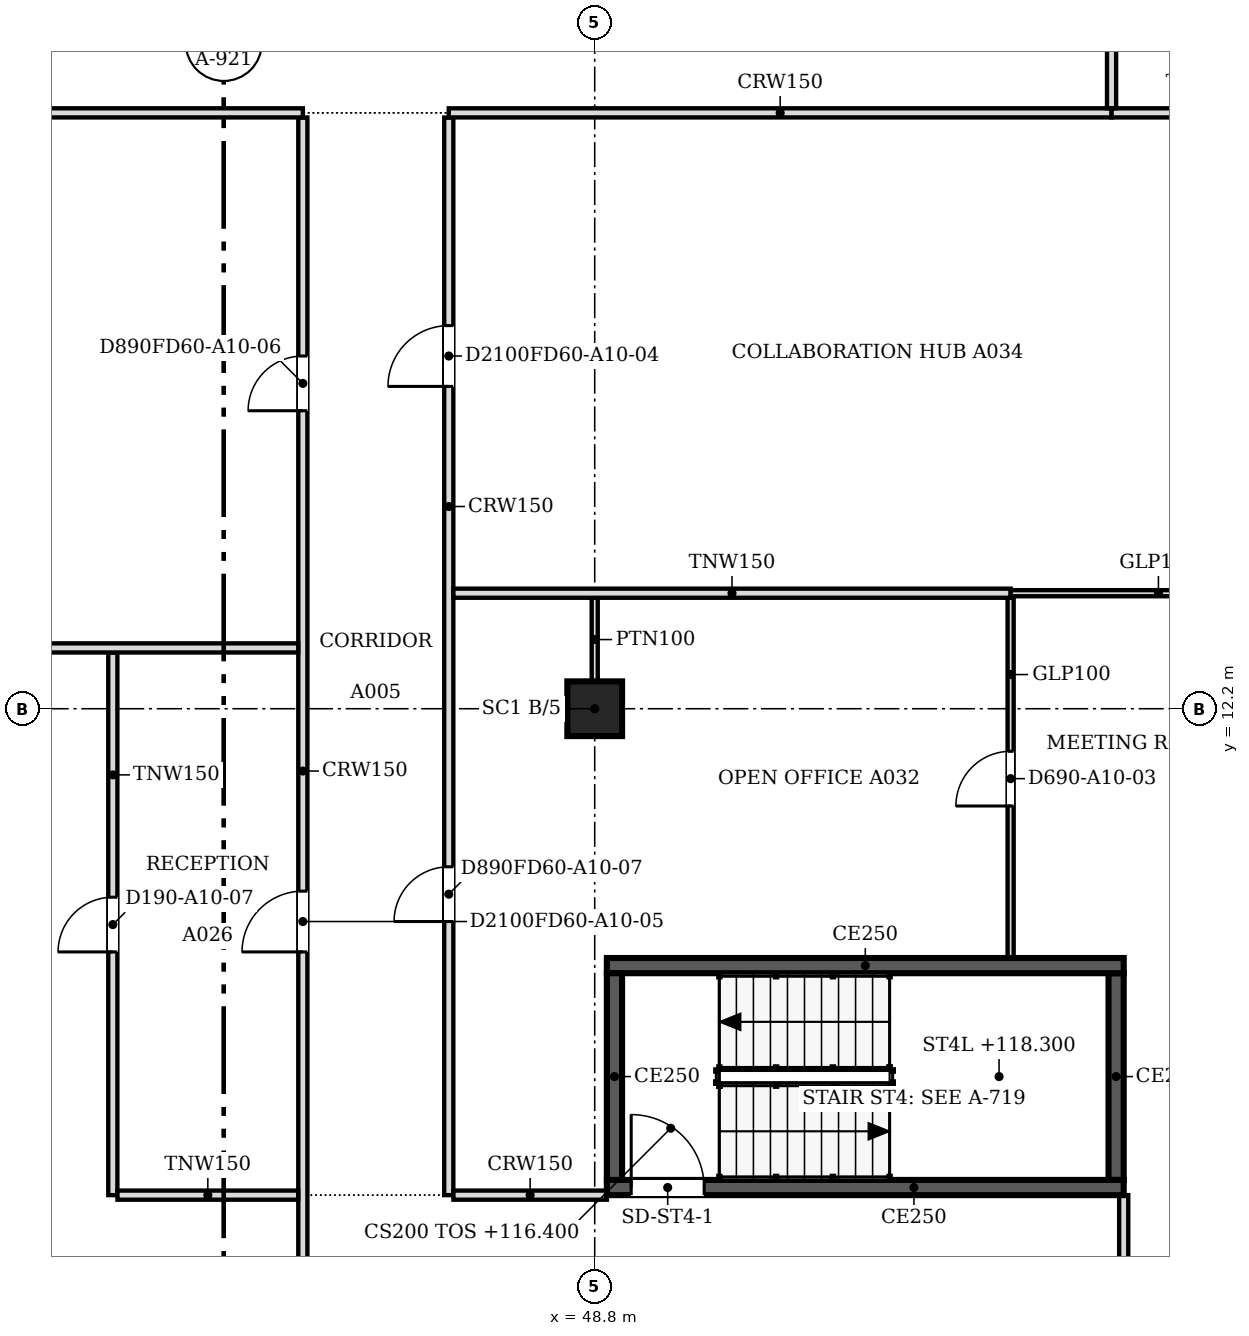
"""IFC4 building model, lengths in metres.
Left out: names, types, materials, properties, quantities, classifications, styles, units other than length and angle.
Written with IfcOpenShell. Run it as: python <this file> out.ifc"""

import sys

from ifc_helpers import new_model, si_unit, direction, frame, frame_2d, origin, origin_2d, place, context, subcontext, project, spatial, polyline, rectangle, outline, extrude, faceted_brep, source, transform, mapped, element, fill, save


model = new_model("IFC4")
c1 = context("Model", 3, precision=1e-05, world=origin(), true_north=direction((0.0, 1.0)))
c2 = subcontext(c1, "Body", "Model", "MODEL_VIEW")
j1 = project(units=[si_unit("LENGTHUNIT", "METRE"), si_unit("PLANEANGLEUNIT", "RADIAN")], contexts=[c1])
p1 = place(None, origin())
s1 = spatial("IfcSite", under=j1, at=p1, CompositionType="ELEMENT")
p2 = place(p1, origin())
s2 = spatial("IfcBuilding", under=s1, at=p2, CompositionType="ELEMENT")
p3 = place(p2, frame((0.0, 0.0, 116.4)))
s3 = spatial("IfcBuildingStorey", under=s2, at=p3, CompositionType="ELEMENT", Elevation=116.4)
p4 = place(p3, frame((48.8, 12.2, 0.0), z_axis=(0.0, 0.0, 1.0), x_axis=(1.0, 0.0, 0.0)))
e1 = element("IfcColumn", 1, at=p4, inside=s3, PredefinedType="COLUMN", context=c2, shape_type="SweptSolid", body=[
    extrude(rectangle(XDim=0.9, YDim=0.9, at=origin_2d()), origin(), (0.0, 0.0, 1.0), 3.6),
])
m1 = source(origin(), c2, "Body", "Brep", [
    faceted_brep([(0.053, -0.25, 0.0), (2.997, -0.25, 3.8), (0.053, -0.25, 7.6), (0.0, -0.25, 7.532), (0.0, -0.25, 0.068), (0.106, 0.25, 7.531), (2.944, 0.25, 3.868), (2.944, 0.25, 3.732), (0.106, 0.25, 0.068), (2.997, 0.0, 3.8), (0.053, 0.0, 0.0), (0.053, 0.0, 7.6)], [[[0, 1, 2, 3, 4]], [[5, 6, 7, 8]], [[8, 7, 9, 1, 0, 10]], [[6, 5, 11, 2, 1, 9]], [[3, 2, 11]], [[10, 0, 4]], [[8, 10, 4, 3, 11, 5]], [[9, 7, 6]]]),
])
p5 = place(p3, frame((57.569, 1.274, -3.8), z_axis=(0.0, 0.0, 1.0), x_axis=(0.707066050402, 0.707147509625, 0.0)))
e2 = element("IfcWall", 2, at=p5, inside=s3, PredefinedType="SOLIDWALL", context=c2, shape_type="MappedRepresentation", body=[
    mapped(m1, transform((0.0, 0.0, 0.0), scale=1.0)),
])
m2 = source(origin(), c2, "Body", "SweptSolid", [
    extrude(outline(polyline([(0.253, 0.666), (2.681, 3.8), (0.253, 6.934), (0.253, 0.666)])), frame((0.0, 0.26, 0.0), z_axis=(0.0, -1.0, 0.0), x_axis=(1.0, 0.0, 0.0)), (0.0, 0.0, 1.0), 0.52),
])
p6 = place(p5, origin())
e3 = element("IfcOpeningElement", 3, at=p6, cuts=e2, PredefinedType="OPENING", context=c2, shape_type="MappedRepresentation", body=[
    mapped(m2, transform((0.0, 0.0, 0.0), scale=1.0)),
])
p7 = place(p2, frame((0.0, 0.0, 120.2)))
s4 = spatial("IfcBuildingStorey", under=s2, at=p7, CompositionType="ELEMENT", Elevation=120.2)
m3 = source(origin(), c2, "Body", "Brep", [
    faceted_brep([(2.944, -0.25, 0.0), (2.997, -0.25, 0.068), (2.997, -0.25, 7.532), (2.944, -0.25, 7.6), (0.0, -0.25, 3.8), (0.053, 0.25, 3.868), (2.891, 0.25, 7.532), (2.891, 0.25, 0.068), (0.053, 0.25, 3.732), (2.944, 0.0, 0.0), (2.944, 0.0, 7.6), (0.0, 0.0, 3.8)], [[[0, 1, 2, 3, 4]], [[5, 6, 7, 8]], [[1, 0, 9]], [[10, 3, 2]], [[6, 5, 11, 4, 3, 10]], [[8, 7, 9, 0, 4, 11]], [[8, 11, 5]], [[1, 9, 7, 6, 10, 2]]]),
])
p8 = place(p7, frame((57.606, 1.312, -3.8), z_axis=(0.0, 0.0, 1.0), x_axis=(0.707147509625, 0.707066050402, 0.0)))
e4 = element("IfcWall", 4, at=p8, inside=s4, PredefinedType="SOLIDWALL", context=c2, shape_type="MappedRepresentation", body=[
    mapped(m3, transform((0.0, 0.0, 0.0), scale=1.0)),
])
m4 = source(origin(), c2, "Body", "SweptSolid", [
    extrude(outline(polyline([(2.744, 6.934), (0.316, 3.8), (2.744, 0.667), (2.744, 6.934)])), frame((0.0, 0.26, 0.0), z_axis=(0.0, -1.0, 0.0), x_axis=(1.0, 0.0, 0.0)), (0.0, 0.0, 1.0), 0.52),
])
p9 = place(p8, origin())
e5 = element("IfcOpeningElement", 5, at=p9, cuts=e4, PredefinedType="OPENING", context=c2, shape_type="MappedRepresentation", body=[
    mapped(m4, transform((0.0, 0.0, 0.0), scale=1.0)),
])
p10 = place(p3, frame((57.5, 4.325, 0.0), z_axis=(0.0, 0.0, 1.0), x_axis=(-1.0, 0.0, 0.0)))
e6 = element("IfcWall", 6, at=p10, inside=s3, PredefinedType="SOLIDWALL", context=c2, shape_type="SweptSolid", body=[
    extrude(rectangle(XDim=8.5, YDim=0.25, at=frame_2d((4.25, 0.0))), origin(), (0.0, 0.0, 1.0), 3.8),
])
m5 = source(origin(), c2, "Body", "SweptSolid", [
    extrude(rectangle(XDim=1.2, YDim=2.1, at=frame_2d((0.6, 1.05))), frame((0.0, 0.135, 0.0), z_axis=(0.0, -1.0, 0.0), x_axis=(1.0, 0.0, 0.0)), (0.0, 0.0, 1.0), 0.27),
])
p11 = place(p10, frame((6.9, 0.0, 0.0)))
e7 = element("IfcOpeningElement", 7, at=p11, cuts=e6, PredefinedType="OPENING", context=c2, shape_type="MappedRepresentation", body=[
    mapped(m5, transform((0.0, 0.0, 0.0), scale=1.0)),
])
p12 = place(p3, frame((49.125, 4.45, 0.0), z_axis=(0.0, 0.0, 1.0), x_axis=(0.0, 1.0, 0.0)))
e8 = element("IfcWall", 8, at=p12, inside=s3, PredefinedType="SOLIDWALL", context=c2, shape_type="SweptSolid", body=[
    extrude(rectangle(XDim=3.4, YDim=0.25, at=frame_2d((1.7, 0.0))), origin(), (0.0, 0.0, 1.0), 3.8),
])
p13 = place(p3, frame((49.0, 7.975, 0.0), z_axis=(0.0, 0.0, 1.0), x_axis=(1.0, 0.0, 0.0)))
e9 = element("IfcWall", 9, at=p13, inside=s3, PredefinedType="SOLIDWALL", context=c2, shape_type="SweptSolid", body=[
    extrude(rectangle(XDim=8.5, YDim=0.25, at=frame_2d((4.25, 0.0))), origin(), (0.0, 0.0, 1.0), 3.8),
])
p14 = place(p3, frame((57.375, 7.85, 0.0), z_axis=(0.0, 0.0, 1.0), x_axis=(0.0, -1.0, 0.0)))
e10 = element("IfcWall", 10, at=p14, inside=s3, PredefinedType="SOLIDWALL", context=c2, shape_type="SweptSolid", body=[
    extrude(rectangle(XDim=3.4, YDim=0.25, at=frame_2d((1.7, 0.0))), origin(), (0.0, 0.0, 1.0), 3.8),
])
p15 = place(p3, frame((44.0, 0.5, 0.0), z_axis=(0.0, 0.0, 1.0), x_axis=(0.0, 1.0, 0.0)))
e11 = element("IfcWall", 11, at=p15, inside=s3, PredefinedType="PARTITIONING", context=c2, shape_type="SweptSolid", body=[
    extrude(rectangle(XDim=21.424, YDim=0.15, at=frame_2d((10.712, 0.0))), origin(), (0.0, 0.0, 1.0), 3.067),
])
m6 = source(origin(), c2, "Body", "SweptSolid", [
    extrude(rectangle(XDim=0.9, YDim=2.1, at=frame_2d((0.45, 1.05))), frame((0.0, 0.085, 0.0), z_axis=(0.0, -1.0, 0.0), x_axis=(1.0, 0.0, 0.0)), (0.0, 0.0, 1.0), 0.17),
])
p16 = place(p15, frame((16.601, 0.0, 0.0)))
e12 = element("IfcOpeningElement", 12, at=p16, cuts=e11, PredefinedType="OPENING", context=c2, shape_type="MappedRepresentation", body=[
    mapped(m6, transform((0.0, 0.0, 0.0), scale=1.0)),
])
m7 = source(origin(), c2, "Body", "SweptSolid", [
    extrude(rectangle(XDim=1.0, YDim=2.1, at=frame_2d((0.5, 1.05))), frame((0.0, 0.085, 0.0), z_axis=(0.0, -1.0, 0.0), x_axis=(1.0, 0.0, 0.0)), (0.0, 0.0, 1.0), 0.17),
])
p17 = place(p15, frame((7.7, 0.0, 0.0)))
e13 = element("IfcOpeningElement", 13, at=p17, cuts=e11, PredefinedType="OPENING", context=c2, shape_type="MappedRepresentation", body=[
    mapped(m7, transform((0.0, 0.0, 0.0), scale=1.0)),
])
p18 = place(p3, frame((57.5, 1.559, 0.0), z_axis=(0.0, 0.0, 1.0), x_axis=(0.0, 1.0, 0.0)))
e14 = element("IfcWall", 14, at=p18, inside=s3, PredefinedType="PARTITIONING", context=c2, shape_type="SweptSolid", body=[
    extrude(rectangle(XDim=2.641, YDim=0.15, at=frame_2d((1.32, 0.0))), origin(), (0.0, 0.0, 1.0), 3.067),
])
p19 = place(p3, frame((40.875, 4.2, 0.0), z_axis=(0.0, 0.0, 1.0), x_axis=(0.0, 1.0, 0.0)))
e15 = element("IfcWall", 15, at=p19, inside=s3, PredefinedType="PARTITIONING", context=c2, shape_type="SweptSolid", body=[
    extrude(rectangle(XDim=8.924, YDim=0.15, at=frame_2d((4.462, 0.0))), origin(), (0.0, 0.0, 1.0), 3.067),
])
p20 = place(p19, frame((4.0, 0.0, 0.0)))
e16 = element("IfcOpeningElement", 16, at=p20, cuts=e15, PredefinedType="OPENING", context=c2, shape_type="MappedRepresentation", body=[
    mapped(m6, transform((0.0, 0.0, 0.0), scale=1.0)),
])
p21 = place(p3, frame((40.951, 4.2, 0.0), z_axis=(0.0, 0.0, 1.0), x_axis=(1.0, 0.0, 0.0)))
e17 = element("IfcWall", 17, at=p21, inside=s3, PredefinedType="PARTITIONING", context=c2, shape_type="SweptSolid", body=[
    extrude(rectangle(XDim=2.973, YDim=0.15, at=frame_2d((1.487, 0.0))), origin(), (0.0, 0.0, 1.0), 3.067),
])
p22 = place(p3, frame((46.4, 21.924, 0.0), z_axis=(0.0, 0.0, 1.0), x_axis=(0.0, -1.0, 0.0)))
e18 = element("IfcWall", 18, at=p22, inside=s3, PredefinedType="PARTITIONING", context=c2, shape_type="SweptSolid", body=[
    extrude(rectangle(XDim=17.724, YDim=0.15, at=frame_2d((8.862, 0.0))), origin(), (0.0, 0.0, 1.0), 3.067),
])
p23 = place(p22, frame((3.423, 0.0, 0.0)))
e19 = element("IfcOpeningElement", 19, at=p23, cuts=e18, PredefinedType="OPENING", context=c2, shape_type="MappedRepresentation", body=[
    mapped(m7, transform((0.0, 0.0, 0.0), scale=1.0)),
])
p24 = place(p22, frame((12.324, 0.0, 0.0)))
e20 = element("IfcOpeningElement", 20, at=p24, cuts=e18, PredefinedType="OPENING", context=c2, shape_type="MappedRepresentation", body=[
    mapped(m6, transform((0.0, 0.0, 0.0), scale=1.0)),
])
p25 = place(p3, frame((46.476, 4.2, 0.0), z_axis=(0.0, 0.0, 1.0), x_axis=(1.0, 0.0, 0.0)))
e21 = element("IfcWall", 21, at=p25, inside=s3, PredefinedType="PARTITIONING", context=c2, shape_type="SweptSolid", body=[
    extrude(rectangle(XDim=2.524, YDim=0.15, at=frame_2d((1.262, 0.0))), origin(), (0.0, 0.0, 1.0), 3.067),
])
p26 = place(p3, frame((55.64, 14.024, 0.0), z_axis=(0.0, 0.0, 1.0), x_axis=(0.0, -1.0, 0.0)))
e22 = element("IfcWall", 22, at=p26, inside=s3, PredefinedType="PARTITIONING", context=c2, shape_type="SweptSolid", body=[
    extrude(rectangle(XDim=5.924, YDim=0.1, at=frame_2d((2.962, 0.0))), origin(), (0.0, 0.0, 1.0), 3.067),
])
m8 = source(origin(), c2, "Body", "SweptSolid", [
    extrude(rectangle(XDim=0.9, YDim=2.1, at=frame_2d((0.45, 1.05))), frame((0.0, 0.06, 0.0), z_axis=(0.0, -1.0, 0.0), x_axis=(1.0, 0.0, 0.0)), (0.0, 0.0, 1.0), 0.12),
])
p27 = place(p26, frame((2.524, 0.0, 0.0)))
e23 = element("IfcOpeningElement", 23, at=p27, cuts=e22, PredefinedType="OPENING", context=c2, shape_type="MappedRepresentation", body=[
    mapped(m8, transform((0.0, 0.0, 0.0), scale=1.0)),
])
p28 = place(p3, frame((48.8, 12.65, 0.0), z_axis=(0.0, 0.0, 1.0), x_axis=(0.0, 1.0, 0.0)))
e24 = element("IfcWall", 24, at=p28, inside=s3, PredefinedType="PARTITIONING", context=c2, shape_type="SweptSolid", body=[
    extrude(rectangle(XDim=1.375, YDim=0.1, at=frame_2d((0.688, 0.0))), origin(), (0.0, 0.0, 1.0), 3.067),
])
p29 = place(p3, frame((27.275, 13.2, 0.0), z_axis=(0.0, 0.0, 1.0), x_axis=(1.0, 0.0, 0.0)))
e25 = element("IfcWall", 25, at=p29, inside=s3, PredefinedType="PARTITIONING", context=c2, shape_type="SweptSolid", body=[
    extrude(rectangle(XDim=16.649, YDim=0.15, at=frame_2d((8.325, 0.0))), origin(), (0.0, 0.0, 1.0), 3.067),
])
p30 = place(p3, frame((46.476, 14.1, 0.0), z_axis=(0.0, 0.0, 1.0), x_axis=(1.0, 0.0, 0.0)))
e26 = element("IfcWall", 26, at=p30, inside=s3, PredefinedType="PARTITIONING", context=c2, shape_type="SweptSolid", body=[
    extrude(rectangle(XDim=9.164, YDim=0.15, at=frame_2d((4.582, 0.0))), origin(), (0.0, 0.0, 1.0), 3.067),
])
p31 = place(p3, frame((55.641, 14.1, 0.0), z_axis=(0.0, 0.0, 1.0), x_axis=(1.0, 0.0, 0.0)))
e27 = element("IfcWall", 27, at=p31, inside=s3, PredefinedType="PARTITIONING", context=c2, shape_type="SweptSolid", body=[
    extrude(rectangle(XDim=4.859, YDim=0.1, at=frame_2d((2.429, 0.0))), origin(), (0.0, 0.0, 1.0), 3.067),
])
p32 = place(p3, frame((30.5, 22.0, 0.0), z_axis=(0.0, 0.0, 1.0), x_axis=(1.0, 0.0, 0.0)))
e28 = element("IfcWall", 28, at=p32, inside=s3, PredefinedType="PARTITIONING", context=c2, shape_type="SweptSolid", body=[
    extrude(rectangle(XDim=13.5, YDim=0.15, at=frame_2d((6.75, 0.0))), origin(), (0.0, 0.0, 1.0), 3.067),
])
p33 = place(p3, frame((46.4, 22.0, 0.0), z_axis=(0.0, 0.0, 1.0), x_axis=(1.0, 0.0, 0.0)))
e29 = element("IfcWall", 29, at=p33, inside=s3, PredefinedType="PARTITIONING", context=c2, shape_type="SweptSolid", body=[
    extrude(rectangle(XDim=10.9, YDim=0.15, at=frame_2d((5.45, 0.0))), origin(), (0.0, 0.0, 1.0), 3.067),
])
p34 = place(p3, frame((57.301, 22.0, 0.0), z_axis=(0.0, 0.0, 1.0), x_axis=(1.0, 0.0, 0.0)))
e30 = element("IfcWall", 30, at=p34, inside=s3, PredefinedType="PARTITIONING", context=c2, shape_type="SweptSolid", body=[
    extrude(rectangle(XDim=3.199, YDim=0.15, at=frame_2d((1.6, 0.0))), origin(), (0.0, 0.0, 1.0), 3.067),
])
p35 = place(p3, frame((57.3, 30.6, 0.0), z_axis=(0.0, 0.0, 1.0), x_axis=(0.0, -1.0, 0.0)))
e31 = element("IfcWall", 31, at=p35, inside=s3, PredefinedType="PARTITIONING", context=c2, shape_type="SweptSolid", body=[
    extrude(rectangle(XDim=8.524, YDim=0.15, at=frame_2d((4.262, 0.0))), origin(), (0.0, 0.0, 1.0), 3.067),
])
p36 = place(p35, frame((3.824, 0.0, 0.0)))
e32 = element("IfcOpeningElement", 32, at=p36, cuts=e31, PredefinedType="OPENING", context=c2, shape_type="MappedRepresentation", body=[
    mapped(m6, transform((0.0, 0.0, 0.0), scale=1.0)),
])
m9 = source(origin(), c2, "Body", "SweptSolid", [
    extrude(rectangle(XDim=1.2, YDim=2.1, at=frame_2d((0.6, 1.05))), frame((0.0, 0.025, 0.0), z_axis=(0.0, -1.0, 0.0), x_axis=(1.0, 0.0, 0.0)), (0.0, 0.0, 1.0), 0.05),
])
p37 = place(p11, origin())
e33 = element("IfcDoor", 33, at=p37, inside=s3, OperationType="SINGLE_SWING_RIGHT", PredefinedType="DOOR", context=c2, shape_type="MappedRepresentation", body=[
    mapped(m9, transform((0.0, 0.0, 0.0), scale=1.0)),
])
fill(e7, e33)
m10 = source(origin(), c2, "Body", "SweptSolid", [
    extrude(rectangle(XDim=0.9, YDim=2.1, at=frame_2d((0.45, 1.05))), frame((0.0, 0.025, 0.0), z_axis=(0.0, -1.0, 0.0), x_axis=(1.0, 0.0, 0.0)), (0.0, 0.0, 1.0), 0.05),
])
p38 = place(p27, origin())
e34 = element("IfcDoor", 34, at=p38, inside=s3, OperationType="SINGLE_SWING_RIGHT", PredefinedType="DOOR", context=c2, shape_type="MappedRepresentation", body=[
    mapped(m10, transform((0.0, 0.0, 0.0), scale=1.0)),
])
fill(e23, e34)
m11 = source(origin(), c2, "Body", "SweptSolid", [
    extrude(rectangle(XDim=1.0, YDim=2.1, at=frame_2d((0.5, 1.05))), frame((0.0, 0.025, 0.0), z_axis=(0.0, -1.0, 0.0), x_axis=(1.0, 0.0, 0.0)), (0.0, 0.0, 1.0), 0.05),
])
p39 = place(p23, origin())
e35 = element("IfcDoor", 35, at=p39, inside=s3, OperationType="SINGLE_SWING_RIGHT", PredefinedType="DOOR", context=c2, shape_type="MappedRepresentation", body=[
    mapped(m11, transform((0.0, 0.0, 0.0), scale=1.0)),
])
fill(e19, e35)
p40 = place(p16, origin())
e36 = element("IfcDoor", 36, at=p40, inside=s3, OperationType="SINGLE_SWING_LEFT", PredefinedType="DOOR", context=c2, shape_type="MappedRepresentation", body=[
    mapped(m10, transform((0.0, 0.0, 0.0), scale=1.0)),
])
fill(e12, e36)
p41 = place(p17, origin())
e37 = element("IfcDoor", 37, at=p41, inside=s3, OperationType="SINGLE_SWING_LEFT", PredefinedType="DOOR", context=c2, shape_type="MappedRepresentation", body=[
    mapped(m11, transform((0.0, 0.0, 0.0), scale=1.0)),
])
fill(e13, e37)
p42 = place(p24, origin())
e38 = element("IfcDoor", 38, at=p42, inside=s3, OperationType="SINGLE_SWING_RIGHT", PredefinedType="DOOR", context=c2, shape_type="MappedRepresentation", body=[
    mapped(m10, transform((0.0, 0.0, 0.0), scale=1.0)),
])
fill(e20, e38)
p43 = place(p20, origin())
e39 = element("IfcDoor", 39, at=p43, inside=s3, OperationType="SINGLE_SWING_LEFT", PredefinedType="DOOR", context=c2, shape_type="MappedRepresentation", body=[
    mapped(m10, transform((0.0, 0.0, 0.0), scale=1.0)),
])
fill(e16, e39)
save(model, sys.argv[1])
